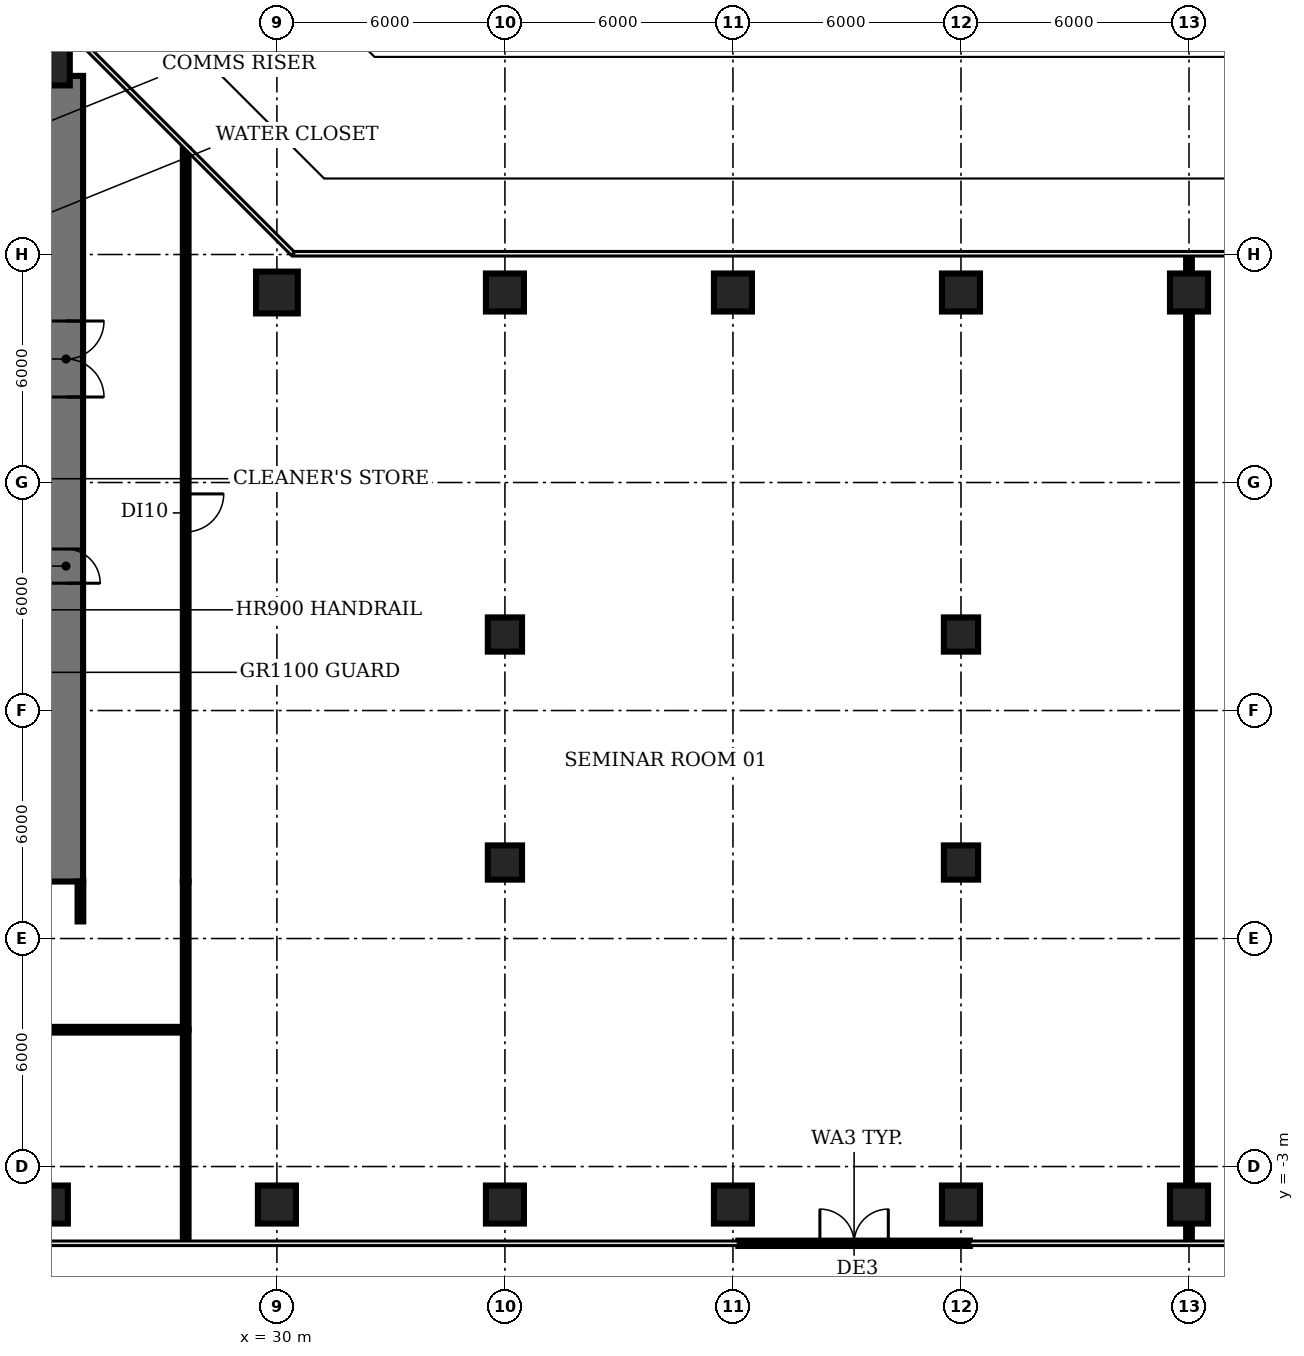
"""IFC4 building model, lengths in metres.
Left out: names, types, materials, properties, quantities, classifications, styles, units other than length and angle.
Written with IfcOpenShell. Run it as: python <this file> out.ifc"""

import sys

from ifc_helpers import new_model, si_unit, direction, frame, frame_2d, origin, origin_2d, place, context, subcontext, project, spatial, rectangle, circle, extrude, element, fill, save


model = new_model("IFC4")
c1 = context("Model", 3, precision=1e-05, world=origin(), true_north=direction((0.0, 1.0)))
c2 = subcontext(c1, "Body", "Model", "MODEL_VIEW")
j1 = project(units=[si_unit("LENGTHUNIT", "METRE"), si_unit("PLANEANGLEUNIT", "RADIAN")], contexts=[c1])
p1 = place(None, origin())
s1 = spatial("IfcSite", under=j1, at=p1, CompositionType="ELEMENT")
p2 = place(p1, origin())
s2 = spatial("IfcBuilding", under=s1, at=p2, CompositionType="ELEMENT")
p3 = place(p2, frame((0.0, 0.0, 11.0)))
s3 = spatial("IfcBuildingStorey", under=s2, at=p3, CompositionType="ELEMENT", Elevation=11.0)
p4 = place(p3, frame((24.0, -4.0, 0.0), z_axis=(0.0, 0.0, 1.0), x_axis=(1.0, 0.0, 0.0)))
e1 = element("IfcColumn", 1, at=p4, inside=s3, PredefinedType="COLUMN", context=c2, shape_type="SweptSolid", body=[
    extrude(rectangle(XDim=1.0, YDim=1.0, at=origin_2d()), origin(), (0.0, 0.0, 1.0), 4.15),
])
p5 = place(p3, frame((24.0, 26.0, 0.0), z_axis=(0.0, 0.0, 1.0), x_axis=(1.0, 0.0, 0.0)))
e2 = element("IfcColumn", 2, at=p5, inside=s3, PredefinedType="COLUMN", context=c2, shape_type="SweptSolid", body=[
    extrude(circle(Radius=0.55, at=origin_2d()), origin(), (0.0, 0.0, 1.0), 4.15),
])
p6 = place(p3, frame((30.0, -4.0, 0.0), z_axis=(0.0, 0.0, 1.0), x_axis=(1.0, 0.0, 0.0)))
e3 = element("IfcColumn", 3, at=p6, inside=s3, PredefinedType="COLUMN", context=c2, shape_type="SweptSolid", body=[
    extrude(rectangle(XDim=1.0, YDim=1.0, at=origin_2d()), origin(), (0.0, 0.0, 1.0), 4.15),
])
p7 = place(p3, frame((30.0, 20.0, 0.0), z_axis=(0.0, 0.0, 1.0), x_axis=(1.0, 0.0, 0.0)))
e4 = element("IfcColumn", 4, at=p7, inside=s3, PredefinedType="COLUMN", context=c2, shape_type="SweptSolid", body=[
    extrude(circle(Radius=0.55, at=origin_2d()), origin(), (0.0, 0.0, 1.0), 4.15),
])
p8 = place(p3, frame((36.0, -4.0, 0.0), z_axis=(0.0, 0.0, 1.0), x_axis=(1.0, 0.0, 0.0)))
e5 = element("IfcColumn", 5, at=p8, inside=s3, PredefinedType="COLUMN", context=c2, shape_type="SweptSolid", body=[
    extrude(rectangle(XDim=1.0, YDim=1.0, at=origin_2d()), origin(), (0.0, 0.0, 1.0), 4.15),
])
for number, where, z_axis, x_axis in (
    (6, (36.0, 5.0, 0.0), (0.0, 0.0, 1.0), (1.0, 0.0, 0.0)),
    (7, (36.0, 11.0, 0.0), (0.0, 0.0, 1.0), (1.0, 0.0, 0.0)),
):
    element("IfcColumn", number, at=place(p3, frame(where, z_axis=z_axis, x_axis=x_axis)), inside=s3, PredefinedType="COLUMN", context=c2, shape_type="SweptSolid", body=[
        extrude(rectangle(XDim=0.9, YDim=0.9, at=origin_2d()), origin(), (0.0, 0.0, 1.0), 4.15),
    ])
for number, where, z_axis, x_axis in (
    (8, (36.0, 20.0, 0.0), (0.0, 0.0, 1.0), (1.0, 0.0, 0.0)),
    (9, (42.0, -4.0, 0.0), (0.0, 0.0, 1.0), (1.0, 0.0, 0.0)),
    (10, (42.0, 20.0, 0.0), (0.0, 0.0, 1.0), (1.0, 0.0, 0.0)),
    (11, (48.0, -4.0, 0.0), (0.0, 0.0, 1.0), (1.0, 0.0, 0.0)),
):
    element("IfcColumn", number, at=place(p3, frame(where, z_axis=z_axis, x_axis=x_axis)), inside=s3, PredefinedType="COLUMN", context=c2, shape_type="SweptSolid", body=[
        extrude(rectangle(XDim=1.0, YDim=1.0, at=origin_2d()), origin(), (0.0, 0.0, 1.0), 4.15),
    ])
for number, where, z_axis, x_axis in (
    (12, (48.0, 5.0, 0.0), (0.0, 0.0, 1.0), (1.0, 0.0, 0.0)),
    (13, (48.0, 11.0, 0.0), (0.0, 0.0, 1.0), (1.0, 0.0, 0.0)),
):
    element("IfcColumn", number, at=place(p3, frame(where, z_axis=z_axis, x_axis=x_axis)), inside=s3, PredefinedType="COLUMN", context=c2, shape_type="SweptSolid", body=[
        extrude(rectangle(XDim=0.9, YDim=0.9, at=origin_2d()), origin(), (0.0, 0.0, 1.0), 4.15),
    ])
for number, where, z_axis, x_axis in (
    (14, (48.0, 20.0, 0.0), (0.0, 0.0, 1.0), (1.0, 0.0, 0.0)),
    (15, (54.0, -4.0, 0.0), (0.0, 0.0, 1.0), (1.0, 0.0, 0.0)),
    (16, (54.0, 20.0, 0.0), (0.0, 0.0, 1.0), (1.0, 0.0, 0.0)),
):
    element("IfcColumn", number, at=place(p3, frame(where, z_axis=z_axis, x_axis=x_axis)), inside=s3, PredefinedType="COLUMN", context=c2, shape_type="SweptSolid", body=[
        extrude(rectangle(XDim=1.0, YDim=1.0, at=origin_2d()), origin(), (0.0, 0.0, 1.0), 4.15),
    ])
p9 = place(p3, frame((42.141, -5.02, 0.0), z_axis=(0.0, 0.0, 1.0), x_axis=(1.0, 0.0, 0.0)))
e17 = element("IfcWall", 17, at=p9, inside=s3, PredefinedType="SOLIDWALL", context=c2, shape_type="SweptSolid", body=[
    extrude(rectangle(XDim=6.094, YDim=0.14, at=frame_2d((3.047, 0.0))), origin(), (0.0, 0.0, 1.0), 4.15),
])
p10 = place(p9, frame((2.147, 0.0, 0.0)))
e18 = element("IfcOpeningElement", 18, at=p10, cuts=e17, PredefinedType="OPENING", context=c2, shape_type="SweptSolid", body=[
    extrude(rectangle(XDim=1.8, YDim=2.4, at=frame_2d((0.9, 1.2))), frame((0.0, 0.08, 0.0), z_axis=(0.0, -1.0, 0.0), x_axis=(1.0, 0.0, 0.0)), (0.0, 0.0, 1.0), 0.16),
])
p11 = place(p3, frame((24.45, 25.7, 0.0), z_axis=(0.0, 0.0, 1.0), x_axis=(0.0, -1.0, 0.0)))
e19 = element("IfcWall", 19, at=p11, inside=s3, PredefinedType="SHEAR", context=c2, shape_type="SweptSolid", body=[
    extrude(rectangle(XDim=21.2, YDim=0.9, at=frame_2d((10.6, 0.0))), origin(), (0.0, 0.0, 1.0), 4.15),
])
p12 = place(p11, frame((12.45, 0.0, 0.0)))
e20 = element("IfcOpeningElement", 20, at=p12, cuts=e19, PredefinedType="OPENING", context=c2, shape_type="SweptSolid", body=[
    extrude(rectangle(XDim=0.9, YDim=2.1, at=frame_2d((0.45, 1.05))), frame((0.0, 0.46, 0.0), z_axis=(0.0, -1.0, 0.0), x_axis=(1.0, 0.0, 0.0)), (0.0, 0.0, 1.0), 0.92),
])
p13 = place(p11, frame((6.45, 0.0, 0.0)))
e21 = element("IfcOpeningElement", 21, at=p13, cuts=e19, PredefinedType="OPENING", context=c2, shape_type="SweptSolid", body=[
    extrude(rectangle(XDim=2.0, YDim=2.1, at=frame_2d((1.0, 1.05))), frame((0.0, 0.46, 0.0), z_axis=(0.0, -1.0, 0.0), x_axis=(1.0, 0.0, 0.0)), (0.0, 0.0, 1.0), 0.92),
])
p14 = place(p3, frame((24.83, 3.45, 0.0), z_axis=(0.0, 0.0, 1.0), x_axis=(0.0, 1.0, 0.0)))
e22 = element("IfcWall", 22, at=p14, inside=s3, PredefinedType="PARTITIONING", context=c2, shape_type="SweptSolid", body=[
    extrude(rectangle(XDim=1.05, YDim=0.15, at=frame_2d((0.525, 0.0))), origin(), (0.0, 0.0, 1.0), 3.08),
])
p15 = place(p3, frame((27.6, -4.97, 0.0), z_axis=(0.0, 0.0, 1.0), x_axis=(0.0, 1.0, 0.0)))
e23 = element("IfcWall", 23, at=p15, inside=s3, PredefinedType="PARTITIONING", context=c2, shape_type="SweptSolid", body=[
    extrude(rectangle(XDim=5.57, YDim=0.15, at=frame_2d((2.785, 0.0))), origin(), (0.0, 0.0, 1.0), 3.08),
])
p16 = place(p3, frame((27.6, 0.6, 0.0), z_axis=(0.0, 0.0, 1.0), x_axis=(-1.0, 0.0, 0.0)))
e24 = element("IfcWall", 24, at=p16, inside=s3, PredefinedType="PARTITIONING", context=c2, shape_type="SweptSolid", body=[
    extrude(rectangle(XDim=25.2, YDim=0.15, at=frame_2d((12.6, 0.0))), origin(), (0.0, 0.0, 1.0), 3.08),
])
p17 = place(p16, frame((12.1, 0.0, 0.0)))
e25 = element("IfcOpeningElement", 25, at=p17, cuts=e24, PredefinedType="OPENING", context=c2, shape_type="SweptSolid", body=[
    extrude(rectangle(XDim=1.2, YDim=2.1, at=frame_2d((0.6, 1.05))), frame((0.0, 0.085, 0.0), z_axis=(0.0, -1.0, 0.0), x_axis=(1.0, 0.0, 0.0)), (0.0, 0.0, 1.0), 0.17),
])
p18 = place(p3, frame((27.6, 0.6, 0.0), z_axis=(0.0, 0.0, 1.0), x_axis=(0.0, 1.0, 0.0)))
e26 = element("IfcWall", 26, at=p18, inside=s3, PredefinedType="PARTITIONING", context=c2, shape_type="SweptSolid", body=[
    extrude(rectangle(XDim=3.9, YDim=0.15, at=frame_2d((1.95, 0.0))), origin(), (0.0, 0.0, 1.0), 3.08),
])
p19 = place(p3, frame((27.6, 23.77, 0.0), z_axis=(0.0, 0.0, 1.0), x_axis=(0.0, -1.0, 0.0)))
e27 = element("IfcWall", 27, at=p19, inside=s3, PredefinedType="PARTITIONING", context=c2, shape_type="SweptSolid", body=[
    extrude(rectangle(XDim=19.27, YDim=0.15, at=frame_2d((9.635, 0.0))), origin(), (0.0, 0.0, 1.0), 3.08),
])
p20 = place(p19, frame((9.07, 0.0, 0.0)))
e28 = element("IfcOpeningElement", 28, at=p20, cuts=e27, PredefinedType="OPENING", context=c2, shape_type="SweptSolid", body=[
    extrude(rectangle(XDim=1.0, YDim=2.1, at=frame_2d((0.5, 1.05))), frame((0.0, 0.085, 0.0), z_axis=(0.0, -1.0, 0.0), x_axis=(1.0, 0.0, 0.0)), (0.0, 0.0, 1.0), 0.17),
])
p21 = place(p3, frame((54.0, -4.97, 0.0), z_axis=(0.0, 0.0, 1.0), x_axis=(0.0, 1.0, 0.0)))
e29 = element("IfcWall", 29, at=p21, inside=s3, PredefinedType="PARTITIONING", context=c2, shape_type="SweptSolid", body=[
    extrude(rectangle(XDim=25.94, YDim=0.15, at=frame_2d((12.97, 0.0))), origin(), (0.0, 0.0, 1.0), 3.08),
])
p22 = place(p10, origin())
e30 = element("IfcDoor", 30, at=p22, inside=s3, OperationType="DOUBLE_DOOR_DOUBLE_SWING", PredefinedType="DOOR", context=c2, shape_type="SweptSolid", body=[
    extrude(rectangle(XDim=1.8, YDim=2.4, at=frame_2d((0.9, 1.2))), frame((0.0, 0.025, 0.0), z_axis=(0.0, -1.0, 0.0), x_axis=(1.0, 0.0, 0.0)), (0.0, 0.0, 1.0), 0.05),
])
fill(e18, e30)
p23 = place(p13, origin())
e31 = element("IfcDoor", 31, at=p23, inside=s3, OperationType="DOUBLE_DOOR_SINGLE_SWING", PredefinedType="DOOR", context=c2, shape_type="SweptSolid", body=[
    extrude(rectangle(XDim=2.0, YDim=2.1, at=frame_2d((1.0, 1.05))), frame((0.0, 0.025, 0.0), z_axis=(0.0, -1.0, 0.0), x_axis=(1.0, 0.0, 0.0)), (0.0, 0.0, 1.0), 0.05),
])
fill(e21, e31)
p24 = place(p20, origin())
e32 = element("IfcDoor", 32, at=p24, inside=s3, OperationType="SINGLE_SWING_LEFT", PredefinedType="DOOR", context=c2, shape_type="SweptSolid", body=[
    extrude(rectangle(XDim=1.0, YDim=2.1, at=frame_2d((0.5, 1.05))), frame((0.0, 0.025, 0.0), z_axis=(0.0, -1.0, 0.0), x_axis=(1.0, 0.0, 0.0)), (0.0, 0.0, 1.0), 0.05),
])
fill(e28, e32)
save(model, sys.argv[1])
